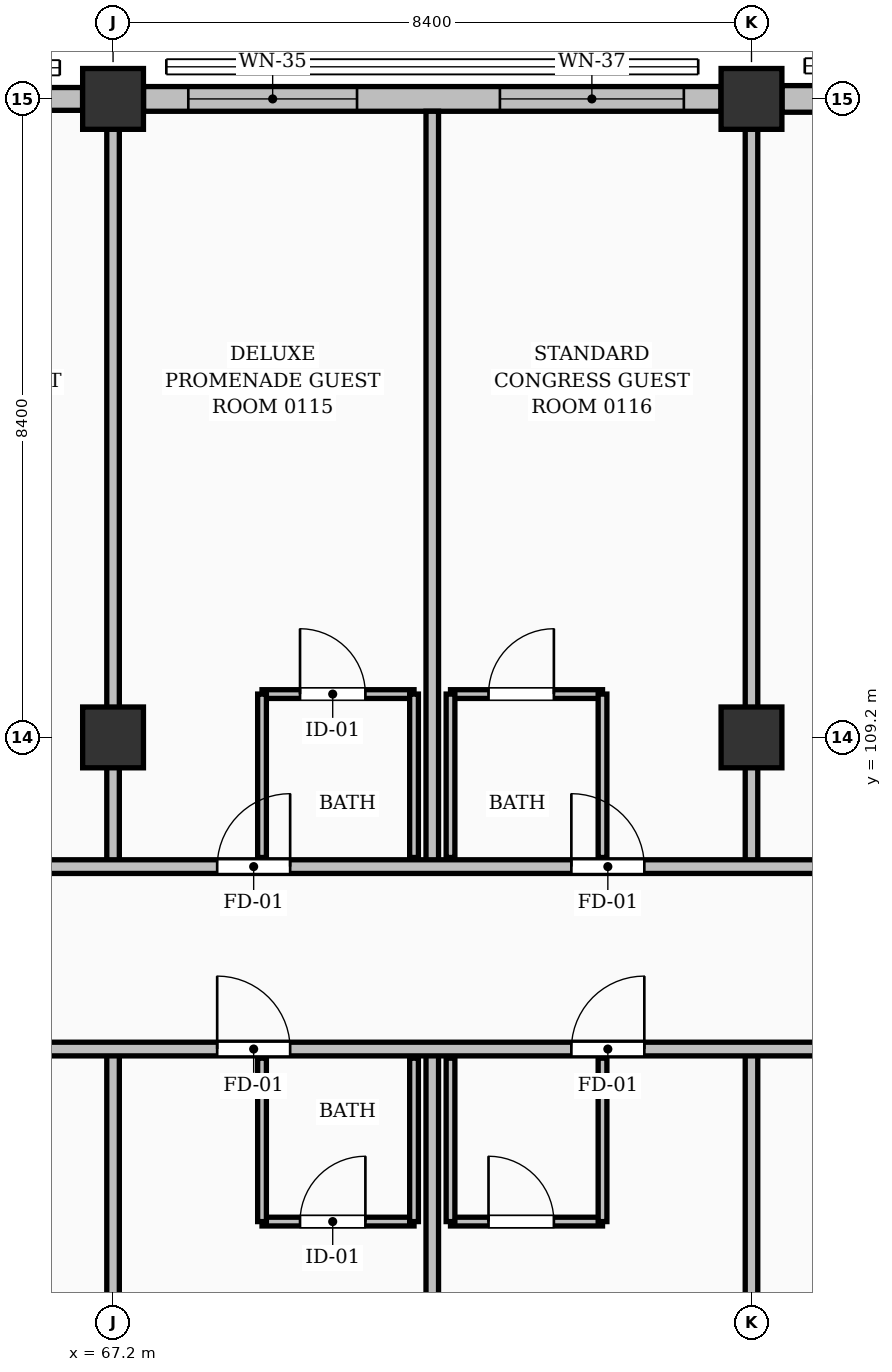
"""IFC4 building model, lengths in metres.
Left out: names, types, materials, properties, quantities, classifications, styles, units other than length and angle.
Written with IfcOpenShell. Run it as: python <this file> out.ifc"""

import sys

from ifc_helpers import new_model, si_unit, direction, frame, frame_2d, origin, origin_2d, place, context, subcontext, project, spatial, rectangle, extrude, element, fill, save


model = new_model("IFC4")
c1 = context("Model", 3, precision=1e-05, world=origin(), true_north=direction((0.0, 1.0)))
c2 = subcontext(c1, "Body", "Model", "MODEL_VIEW")
j1 = project(units=[si_unit("LENGTHUNIT", "METRE"), si_unit("PLANEANGLEUNIT", "RADIAN")], contexts=[c1])
p1 = place(None, origin())
s1 = spatial("IfcSite", under=j1, at=p1, CompositionType="ELEMENT")
p2 = place(p1, origin())
s2 = spatial("IfcBuilding", under=s1, at=p2, CompositionType="ELEMENT")
p3 = place(p2, frame((0.0, 0.0, 3.92)))
s3 = spatial("IfcBuildingStorey", under=s2, at=p3, CompositionType="ELEMENT", Elevation=3.92)
for number, where, z_axis, x_axis in (
    (1, (67.2, 109.2, 0.0), (0.0, 0.0, 1.0), (1.0, 0.0, 0.0)),
    (2, (67.2, 117.6, 0.0), (0.0, 0.0, 1.0), (1.0, 0.0, 0.0)),
    (3, (75.6, 109.2, 0.0), (0.0, 0.0, 1.0), (1.0, 0.0, 0.0)),
    (4, (75.6, 117.6, 0.0), (0.0, 0.0, 1.0), (1.0, 0.0, 0.0)),
):
    element("IfcColumn", number, at=place(p3, frame(where, z_axis=z_axis, x_axis=x_axis)), inside=s3, PredefinedType="COLUMN", context=c2, shape_type="SweptSolid", body=[
        extrude(rectangle(XDim=0.8, YDim=0.8, at=origin_2d()), origin(), (0.0, 0.0, 1.0), 3.64),
    ])
p4 = place(p3, frame((59.201, 117.6, 0.0), z_axis=(0.0, 0.0, 1.0), x_axis=(1.0, 0.0, 0.0)))
e5 = element("IfcWall", 5, at=p4, inside=s3, PredefinedType="SOLIDWALL", context=c2, shape_type="SweptSolid", body=[
    extrude(rectangle(XDim=7.598, YDim=0.3, at=frame_2d((3.799, 0.0))), origin(), (0.0, 0.0, 1.0), 2.445),
])
p5 = place(p4, frame((0.549, 0.0, 0.25)))
e6 = element("IfcOpeningElement", 6, at=p5, cuts=e5, PredefinedType="OPENING", context=c2, shape_type="SweptSolid", body=[
    extrude(rectangle(XDim=2.3, YDim=1.75, at=frame_2d((1.15, 0.875))), frame((0.0, 0.16, 0.0), z_axis=(0.0, -1.0, 0.0), x_axis=(1.0, 0.0, 0.0)), (0.0, 0.0, 1.0), 0.32),
])
p6 = place(p4, frame((4.789, 0.0, 0.25)))
e7 = element("IfcOpeningElement", 7, at=p6, cuts=e5, PredefinedType="OPENING", context=c2, shape_type="SweptSolid", body=[
    extrude(rectangle(XDim=2.22, YDim=1.9, at=frame_2d((1.11, 0.95))), frame((0.0, 0.16, 0.0), z_axis=(0.0, -1.0, 0.0), x_axis=(1.0, 0.0, 0.0)), (0.0, 0.0, 1.0), 0.32),
])
p7 = place(p3, frame((67.601, 117.6, 0.0), z_axis=(0.0, 0.0, 1.0), x_axis=(1.0, 0.0, 0.0)))
e8 = element("IfcWall", 8, at=p7, inside=s3, PredefinedType="SOLIDWALL", context=c2, shape_type="SweptSolid", body=[
    extrude(rectangle(XDim=7.598, YDim=0.325, at=frame_2d((3.799, 0.0))), origin(), (0.0, 0.0, 1.0), 2.445),
])
p8 = place(p7, frame((0.589, 0.0, 0.25)))
e9 = element("IfcOpeningElement", 9, at=p8, cuts=e8, PredefinedType="OPENING", context=c2, shape_type="SweptSolid", body=[
    extrude(rectangle(XDim=2.22, YDim=1.9, at=frame_2d((1.11, 0.95))), frame((0.0, 0.172, 0.0), z_axis=(0.0, -1.0, 0.0), x_axis=(1.0, 0.0, 0.0)), (0.0, 0.0, 1.0), 0.345),
])
p9 = place(p7, frame((4.689, 0.0, 0.25)))
e10 = element("IfcOpeningElement", 10, at=p9, cuts=e8, PredefinedType="OPENING", context=c2, shape_type="SweptSolid", body=[
    extrude(rectangle(XDim=2.42, YDim=1.9, at=frame_2d((1.21, 0.95))), frame((0.0, 0.172, 0.0), z_axis=(0.0, -1.0, 0.0), x_axis=(1.0, 0.0, 0.0)), (0.0, 0.0, 1.0), 0.345),
])
p10 = place(p3, frame((76.001, 117.6, 0.0), z_axis=(0.0, 0.0, 1.0), x_axis=(1.0, 0.0, 0.0)))
e11 = element("IfcWall", 11, at=p10, inside=s3, PredefinedType="SOLIDWALL", context=c2, shape_type="SweptSolid", body=[
    extrude(rectangle(XDim=7.548, YDim=0.35, at=frame_2d((3.774, 0.0))), origin(), (0.0, 0.0, 1.0), 2.445),
])
p11 = place(p10, frame((0.489, 0.0, 0.25)))
e12 = element("IfcOpeningElement", 12, at=p11, cuts=e11, PredefinedType="OPENING", context=c2, shape_type="SweptSolid", body=[
    extrude(rectangle(XDim=2.42, YDim=1.9, at=frame_2d((1.21, 0.95))), frame((0.0, 0.185, 0.0), z_axis=(0.0, -1.0, 0.0), x_axis=(1.0, 0.0, 0.0)), (0.0, 0.0, 1.0), 0.37),
])
p12 = place(p10, frame((4.709, 0.0, 0.25)))
e13 = element("IfcOpeningElement", 13, at=p12, cuts=e11, PredefinedType="OPENING", context=c2, shape_type="SweptSolid", body=[
    extrude(rectangle(XDim=2.38, YDim=2.0, at=frame_2d((1.19, 1.0))), frame((0.0, 0.185, 0.0), z_axis=(0.0, -1.0, 0.0), x_axis=(1.0, 0.0, 0.0)), (0.0, 0.0, 1.0), 0.37),
])
p13 = place(p3, frame((69.16, 109.77, 0.0), z_axis=(0.0, 0.0, 1.0), x_axis=(1.0, 0.0, 0.0)))
e14 = element("IfcWall", 14, at=p13, inside=s3, PredefinedType="PARTITIONING", context=c2, shape_type="SweptSolid", body=[
    extrude(rectangle(XDim=2.0, YDim=0.115, at=frame_2d((1.0, 0.0))), origin(), (0.0, 0.0, 1.0), 3.36),
])
p14 = place(p13, frame((0.5, 0.0, 0.0)))
e15 = element("IfcOpeningElement", 15, at=p14, cuts=e14, PredefinedType="OPENING", context=c2, shape_type="SweptSolid", body=[
    extrude(rectangle(XDim=0.86, YDim=2.05, at=frame_2d((0.43, 1.025))), frame((0.0, 0.067, 0.0), z_axis=(0.0, -1.0, 0.0), x_axis=(1.0, 0.0, 0.0)), (0.0, 0.0, 1.0), 0.135),
])
for number, where, z_axis, x_axis in (
    (16, (69.16, 107.62, 0.0), (0.0, 0.0, 1.0), (0.0, 1.0, 0.0)),
    (17, (71.16, 107.62, 0.0), (0.0, 0.0, 1.0), (0.0, 1.0, 0.0)),
):
    element("IfcWall", number, at=place(p3, frame(where, z_axis=z_axis, x_axis=x_axis)), inside=s3, PredefinedType="PARTITIONING", context=c2, shape_type="SweptSolid", body=[
        extrude(rectangle(XDim=2.15, YDim=0.115, at=frame_2d((1.075, 0.0))), origin(), (0.0, 0.0, 1.0), 3.36),
    ])
p15 = place(p3, frame((71.64, 109.77, 0.0), z_axis=(0.0, 0.0, 1.0), x_axis=(1.0, 0.0, 0.0)))
e18 = element("IfcWall", 18, at=p15, inside=s3, PredefinedType="PARTITIONING", context=c2, shape_type="SweptSolid", body=[
    extrude(rectangle(XDim=2.0, YDim=0.115, at=frame_2d((1.0, 0.0))), origin(), (0.0, 0.0, 1.0), 3.36),
])
p16 = place(p15, frame((0.5, 0.0, 0.0)))
e19 = element("IfcOpeningElement", 19, at=p16, cuts=e18, PredefinedType="OPENING", context=c2, shape_type="SweptSolid", body=[
    extrude(rectangle(XDim=0.86, YDim=2.05, at=frame_2d((0.43, 1.025))), frame((0.0, 0.067, 0.0), z_axis=(0.0, -1.0, 0.0), x_axis=(1.0, 0.0, 0.0)), (0.0, 0.0, 1.0), 0.135),
])
for number, where, z_axis, x_axis in (
    (20, (71.64, 107.62, 0.0), (0.0, 0.0, 1.0), (0.0, 1.0, 0.0)),
    (21, (73.64, 107.62, 0.0), (0.0, 0.0, 1.0), (0.0, 1.0, 0.0)),
):
    element("IfcWall", number, at=place(p3, frame(where, z_axis=z_axis, x_axis=x_axis)), inside=s3, PredefinedType="PARTITIONING", context=c2, shape_type="SweptSolid", body=[
        extrude(rectangle(XDim=2.15, YDim=0.115, at=frame_2d((1.075, 0.0))), origin(), (0.0, 0.0, 1.0), 3.36),
    ])
p17 = place(p3, frame((71.4, 107.5, 0.0), z_axis=(0.0, 0.0, 1.0), x_axis=(0.0, 1.0, 0.0)))
e22 = element("IfcWall", 22, at=p17, inside=s3, PredefinedType="PARTITIONING", context=c2, shape_type="SweptSolid", body=[
    extrude(rectangle(XDim=9.938, YDim=0.165, at=frame_2d((4.969, 0.0))), origin(), (0.0, 0.0, 1.0), 3.36),
])
for number, where, z_axis, x_axis in (
    (23, (67.2, 107.5, 0.0), (0.0, 0.0, 1.0), (0.0, 1.0, 0.0)),
    (24, (75.6, 107.5, 0.0), (0.0, 0.0, 1.0), (0.0, 1.0, 0.0)),
):
    element("IfcWall", number, at=place(p3, frame(where, z_axis=z_axis, x_axis=x_axis)), inside=s3, PredefinedType="PARTITIONING", context=c2, shape_type="SweptSolid", body=[
        extrude(rectangle(XDim=9.75, YDim=0.165, at=frame_2d((4.875, 0.0))), origin(), (0.0, 0.0, 1.0), 2.495),
    ])
p18 = place(p3, frame((40.66, 107.5, 0.0), z_axis=(0.0, 0.0, 1.0), x_axis=(1.0, 0.0, 0.0)))
e25 = element("IfcWall", 25, at=p18, inside=s3, PredefinedType="PARTITIONING", context=c2, shape_type="SweptSolid", body=[
    extrude(rectangle(XDim=43.15, YDim=0.18, at=frame_2d((21.575, 0.0))), origin(), (0.0, 0.0, 1.0), 3.36),
])
p19 = place(p18, frame((0.2, 0.0, 0.0)))
e26 = element("IfcOpeningElement", 26, at=p19, cuts=e25, PredefinedType="OPENING", context=c2, shape_type="SweptSolid", body=[
    extrude(rectangle(XDim=0.94, YDim=2.1, at=frame_2d((0.47, 1.05))), frame((0.0, 0.1, 0.0), z_axis=(0.0, -1.0, 0.0), x_axis=(1.0, 0.0, 0.0)), (0.0, 0.0, 1.0), 0.2),
])
p20 = place(p18, frame((2.71, 0.0, 0.0)))
e27 = element("IfcOpeningElement", 27, at=p20, cuts=e25, PredefinedType="OPENING", context=c2, shape_type="SweptSolid", body=[
    extrude(rectangle(XDim=0.96, YDim=2.15, at=frame_2d((0.48, 1.075))), frame((0.0, 0.1, 0.0), z_axis=(0.0, -1.0, 0.0), x_axis=(1.0, 0.0, 0.0)), (0.0, 0.0, 1.0), 0.2),
])
p21 = place(p18, frame((7.37, 0.0, 0.0)))
e28 = element("IfcOpeningElement", 28, at=p21, cuts=e25, PredefinedType="OPENING", context=c2, shape_type="SweptSolid", body=[
    extrude(rectangle(XDim=0.96, YDim=2.15, at=frame_2d((0.48, 1.075))), frame((0.0, 0.1, 0.0), z_axis=(0.0, -1.0, 0.0), x_axis=(1.0, 0.0, 0.0)), (0.0, 0.0, 1.0), 0.2),
])
p22 = place(p18, frame((11.11, 0.0, 0.0)))
e29 = element("IfcOpeningElement", 29, at=p22, cuts=e25, PredefinedType="OPENING", context=c2, shape_type="SweptSolid", body=[
    extrude(rectangle(XDim=0.96, YDim=2.15, at=frame_2d((0.48, 1.075))), frame((0.0, 0.1, 0.0), z_axis=(0.0, -1.0, 0.0), x_axis=(1.0, 0.0, 0.0)), (0.0, 0.0, 1.0), 0.2),
])
p23 = place(p18, frame((15.77, 0.0, 0.0)))
e30 = element("IfcOpeningElement", 30, at=p23, cuts=e25, PredefinedType="OPENING", context=c2, shape_type="SweptSolid", body=[
    extrude(rectangle(XDim=0.96, YDim=2.15, at=frame_2d((0.48, 1.075))), frame((0.0, 0.1, 0.0), z_axis=(0.0, -1.0, 0.0), x_axis=(1.0, 0.0, 0.0)), (0.0, 0.0, 1.0), 0.2),
])
p24 = place(p18, frame((19.51, 0.0, 0.0)))
e31 = element("IfcOpeningElement", 31, at=p24, cuts=e25, PredefinedType="OPENING", context=c2, shape_type="SweptSolid", body=[
    extrude(rectangle(XDim=0.96, YDim=2.15, at=frame_2d((0.48, 1.075))), frame((0.0, 0.1, 0.0), z_axis=(0.0, -1.0, 0.0), x_axis=(1.0, 0.0, 0.0)), (0.0, 0.0, 1.0), 0.2),
])
p25 = place(p18, frame((24.17, 0.0, 0.0)))
e32 = element("IfcOpeningElement", 32, at=p25, cuts=e25, PredefinedType="OPENING", context=c2, shape_type="SweptSolid", body=[
    extrude(rectangle(XDim=0.96, YDim=2.15, at=frame_2d((0.48, 1.075))), frame((0.0, 0.1, 0.0), z_axis=(0.0, -1.0, 0.0), x_axis=(1.0, 0.0, 0.0)), (0.0, 0.0, 1.0), 0.2),
])
p26 = place(p18, frame((27.91, 0.0, 0.0)))
e33 = element("IfcOpeningElement", 33, at=p26, cuts=e25, PredefinedType="OPENING", context=c2, shape_type="SweptSolid", body=[
    extrude(rectangle(XDim=0.96, YDim=2.15, at=frame_2d((0.48, 1.075))), frame((0.0, 0.1, 0.0), z_axis=(0.0, -1.0, 0.0), x_axis=(1.0, 0.0, 0.0)), (0.0, 0.0, 1.0), 0.2),
])
p27 = place(p18, frame((32.57, 0.0, 0.0)))
e34 = element("IfcOpeningElement", 34, at=p27, cuts=e25, PredefinedType="OPENING", context=c2, shape_type="SweptSolid", body=[
    extrude(rectangle(XDim=0.96, YDim=2.15, at=frame_2d((0.48, 1.075))), frame((0.0, 0.1, 0.0), z_axis=(0.0, -1.0, 0.0), x_axis=(1.0, 0.0, 0.0)), (0.0, 0.0, 1.0), 0.2),
])
p28 = place(p18, frame((36.31, 0.0, 0.0)))
e35 = element("IfcOpeningElement", 35, at=p28, cuts=e25, PredefinedType="OPENING", context=c2, shape_type="SweptSolid", body=[
    extrude(rectangle(XDim=0.96, YDim=2.15, at=frame_2d((0.48, 1.075))), frame((0.0, 0.1, 0.0), z_axis=(0.0, -1.0, 0.0), x_axis=(1.0, 0.0, 0.0)), (0.0, 0.0, 1.0), 0.2),
])
p29 = place(p18, frame((40.97, 0.0, 0.0)))
e36 = element("IfcOpeningElement", 36, at=p29, cuts=e25, PredefinedType="OPENING", context=c2, shape_type="SweptSolid", body=[
    extrude(rectangle(XDim=0.96, YDim=2.15, at=frame_2d((0.48, 1.075))), frame((0.0, 0.1, 0.0), z_axis=(0.0, -1.0, 0.0), x_axis=(1.0, 0.0, 0.0)), (0.0, 0.0, 1.0), 0.2),
])
p30 = place(p3, frame((69.16, 102.83, 0.0), z_axis=(0.0, 0.0, 1.0), x_axis=(1.0, 0.0, 0.0)))
e37 = element("IfcWall", 37, at=p30, inside=s3, PredefinedType="PARTITIONING", context=c2, shape_type="SweptSolid", body=[
    extrude(rectangle(XDim=2.0, YDim=0.115, at=frame_2d((1.0, 0.0))), origin(), (0.0, 0.0, 1.0), 3.36),
])
p31 = place(p30, frame((0.5, 0.0, 0.0)))
e38 = element("IfcOpeningElement", 38, at=p31, cuts=e37, PredefinedType="OPENING", context=c2, shape_type="SweptSolid", body=[
    extrude(rectangle(XDim=0.86, YDim=2.05, at=frame_2d((0.43, 1.025))), frame((0.0, 0.067, 0.0), z_axis=(0.0, -1.0, 0.0), x_axis=(1.0, 0.0, 0.0)), (0.0, 0.0, 1.0), 0.135),
])
for number, where, z_axis, x_axis in (
    (39, (69.16, 102.83, 0.0), (0.0, 0.0, 1.0), (0.0, 1.0, 0.0)),
    (40, (71.16, 102.83, 0.0), (0.0, 0.0, 1.0), (0.0, 1.0, 0.0)),
):
    element("IfcWall", number, at=place(p3, frame(where, z_axis=z_axis, x_axis=x_axis)), inside=s3, PredefinedType="PARTITIONING", context=c2, shape_type="SweptSolid", body=[
        extrude(rectangle(XDim=2.15, YDim=0.115, at=frame_2d((1.075, 0.0))), origin(), (0.0, 0.0, 1.0), 3.36),
    ])
p32 = place(p3, frame((71.64, 102.83, 0.0), z_axis=(0.0, 0.0, 1.0), x_axis=(1.0, 0.0, 0.0)))
e41 = element("IfcWall", 41, at=p32, inside=s3, PredefinedType="PARTITIONING", context=c2, shape_type="SweptSolid", body=[
    extrude(rectangle(XDim=2.0, YDim=0.115, at=frame_2d((1.0, 0.0))), origin(), (0.0, 0.0, 1.0), 3.36),
])
p33 = place(p32, frame((0.5, 0.0, 0.0)))
e42 = element("IfcOpeningElement", 42, at=p33, cuts=e41, PredefinedType="OPENING", context=c2, shape_type="SweptSolid", body=[
    extrude(rectangle(XDim=0.86, YDim=2.05, at=frame_2d((0.43, 1.025))), frame((0.0, 0.067, 0.0), z_axis=(0.0, -1.0, 0.0), x_axis=(1.0, 0.0, 0.0)), (0.0, 0.0, 1.0), 0.135),
])
for number, where, z_axis, x_axis in (
    (43, (71.64, 102.83, 0.0), (0.0, 0.0, 1.0), (0.0, 1.0, 0.0)),
    (44, (73.64, 102.83, 0.0), (0.0, 0.0, 1.0), (0.0, 1.0, 0.0)),
):
    element("IfcWall", number, at=place(p3, frame(where, z_axis=z_axis, x_axis=x_axis)), inside=s3, PredefinedType="PARTITIONING", context=c2, shape_type="SweptSolid", body=[
        extrude(rectangle(XDim=2.15, YDim=0.115, at=frame_2d((1.075, 0.0))), origin(), (0.0, 0.0, 1.0), 3.36),
    ])
p34 = place(p3, frame((71.4, 84.163, 0.0), z_axis=(0.0, 0.0, 1.0), x_axis=(0.0, 1.0, 0.0)))
e45 = element("IfcWall", 45, at=p34, inside=s3, PredefinedType="PARTITIONING", context=c2, shape_type="SweptSolid", body=[
    extrude(rectangle(XDim=20.938, YDim=0.165, at=frame_2d((10.469, 0.0))), origin(), (0.0, 0.0, 1.0), 3.36),
])
for number, where, z_axis, x_axis in (
    (46, (67.2, 84.35, 0.0), (0.0, 0.0, 1.0), (0.0, 1.0, 0.0)),
    (47, (75.6, 84.35, 0.0), (0.0, 0.0, 1.0), (0.0, 1.0, 0.0)),
):
    element("IfcWall", number, at=place(p3, frame(where, z_axis=z_axis, x_axis=x_axis)), inside=s3, PredefinedType="PARTITIONING", context=c2, shape_type="SweptSolid", body=[
        extrude(rectangle(XDim=20.75, YDim=0.165, at=frame_2d((10.375, 0.0))), origin(), (0.0, 0.0, 1.0), 2.495),
    ])
p35 = place(p3, frame((54.4, 105.1, 0.0), z_axis=(0.0, 0.0, 1.0), x_axis=(1.0, 0.0, 0.0)))
e48 = element("IfcWall", 48, at=p35, inside=s3, PredefinedType="PARTITIONING", context=c2, shape_type="SweptSolid", body=[
    extrude(rectangle(XDim=29.41, YDim=0.18, at=frame_2d((14.705, 0.0))), origin(), (0.0, 0.0, 1.0), 3.36),
])
p36 = place(p35, frame((2.03, 0.0, 0.0)))
e49 = element("IfcOpeningElement", 49, at=p36, cuts=e48, PredefinedType="OPENING", context=c2, shape_type="SweptSolid", body=[
    extrude(rectangle(XDim=0.96, YDim=2.15, at=frame_2d((0.48, 1.075))), frame((0.0, 0.1, 0.0), z_axis=(0.0, -1.0, 0.0), x_axis=(1.0, 0.0, 0.0)), (0.0, 0.0, 1.0), 0.2),
])
p37 = place(p35, frame((5.77, 0.0, 0.0)))
e50 = element("IfcOpeningElement", 50, at=p37, cuts=e48, PredefinedType="OPENING", context=c2, shape_type="SweptSolid", body=[
    extrude(rectangle(XDim=0.96, YDim=2.15, at=frame_2d((0.48, 1.075))), frame((0.0, 0.1, 0.0), z_axis=(0.0, -1.0, 0.0), x_axis=(1.0, 0.0, 0.0)), (0.0, 0.0, 1.0), 0.2),
])
p38 = place(p35, frame((10.43, 0.0, 0.0)))
e51 = element("IfcOpeningElement", 51, at=p38, cuts=e48, PredefinedType="OPENING", context=c2, shape_type="SweptSolid", body=[
    extrude(rectangle(XDim=0.96, YDim=2.15, at=frame_2d((0.48, 1.075))), frame((0.0, 0.1, 0.0), z_axis=(0.0, -1.0, 0.0), x_axis=(1.0, 0.0, 0.0)), (0.0, 0.0, 1.0), 0.2),
])
p39 = place(p35, frame((14.17, 0.0, 0.0)))
e52 = element("IfcOpeningElement", 52, at=p39, cuts=e48, PredefinedType="OPENING", context=c2, shape_type="SweptSolid", body=[
    extrude(rectangle(XDim=0.96, YDim=2.15, at=frame_2d((0.48, 1.075))), frame((0.0, 0.1, 0.0), z_axis=(0.0, -1.0, 0.0), x_axis=(1.0, 0.0, 0.0)), (0.0, 0.0, 1.0), 0.2),
])
p40 = place(p35, frame((18.83, 0.0, 0.0)))
e53 = element("IfcOpeningElement", 53, at=p40, cuts=e48, PredefinedType="OPENING", context=c2, shape_type="SweptSolid", body=[
    extrude(rectangle(XDim=0.96, YDim=2.15, at=frame_2d((0.48, 1.075))), frame((0.0, 0.1, 0.0), z_axis=(0.0, -1.0, 0.0), x_axis=(1.0, 0.0, 0.0)), (0.0, 0.0, 1.0), 0.2),
])
p41 = place(p35, frame((22.57, 0.0, 0.0)))
e54 = element("IfcOpeningElement", 54, at=p41, cuts=e48, PredefinedType="OPENING", context=c2, shape_type="SweptSolid", body=[
    extrude(rectangle(XDim=0.96, YDim=2.15, at=frame_2d((0.48, 1.075))), frame((0.0, 0.1, 0.0), z_axis=(0.0, -1.0, 0.0), x_axis=(1.0, 0.0, 0.0)), (0.0, 0.0, 1.0), 0.2),
])
p42 = place(p35, frame((27.23, 0.0, 0.0)))
e55 = element("IfcOpeningElement", 55, at=p42, cuts=e48, PredefinedType="OPENING", context=c2, shape_type="SweptSolid", body=[
    extrude(rectangle(XDim=0.96, YDim=2.15, at=frame_2d((0.48, 1.075))), frame((0.0, 0.1, 0.0), z_axis=(0.0, -1.0, 0.0), x_axis=(1.0, 0.0, 0.0)), (0.0, 0.0, 1.0), 0.2),
])
p43 = place(p8, origin())
e56 = element("IfcWindow", 56, at=p43, inside=s3, PartitioningType="DOUBLE_PANEL_VERTICAL", PredefinedType="WINDOW", context=c2, shape_type="SweptSolid", body=[
    extrude(rectangle(XDim=2.22, YDim=1.9, at=frame_2d((1.11, 0.95))), frame((0.0, 0.03, 0.0), z_axis=(0.0, -1.0, 0.0), x_axis=(1.0, 0.0, 0.0)), (0.0, 0.0, 1.0), 0.06),
])
fill(e9, e56)
p44 = place(p9, origin())
e57 = element("IfcWindow", 57, at=p44, inside=s3, PartitioningType="DOUBLE_PANEL_VERTICAL", PredefinedType="WINDOW", context=c2, shape_type="SweptSolid", body=[
    extrude(rectangle(XDim=2.42, YDim=1.9, at=frame_2d((1.21, 0.95))), frame((0.0, 0.03, 0.0), z_axis=(0.0, -1.0, 0.0), x_axis=(1.0, 0.0, 0.0)), (0.0, 0.0, 1.0), 0.06),
])
fill(e10, e57)
p45 = place(p14, origin())
e58 = element("IfcDoor", 58, at=p45, inside=s3, OperationType="SINGLE_SWING_LEFT", PredefinedType="DOOR", context=c2, shape_type="SweptSolid", body=[
    extrude(rectangle(XDim=0.86, YDim=2.05, at=frame_2d((0.43, 1.025))), frame((0.0, 0.025, 0.0), z_axis=(0.0, -1.0, 0.0), x_axis=(1.0, 0.0, 0.0)), (0.0, 0.0, 1.0), 0.05),
])
fill(e15, e58)
p46 = place(p16, origin())
e59 = element("IfcDoor", 59, at=p46, inside=s3, OperationType="SINGLE_SWING_RIGHT", PredefinedType="DOOR", context=c2, shape_type="SweptSolid", body=[
    extrude(rectangle(XDim=0.86, YDim=2.05, at=frame_2d((0.43, 1.025))), frame((0.0, 0.025, 0.0), z_axis=(0.0, -1.0, 0.0), x_axis=(1.0, 0.0, 0.0)), (0.0, 0.0, 1.0), 0.05),
])
fill(e19, e59)
p47 = place(p26, origin())
e60 = element("IfcDoor", 60, at=p47, inside=s3, OperationType="SINGLE_SWING_RIGHT", PredefinedType="DOOR", context=c2, shape_type="SweptSolid", body=[
    extrude(rectangle(XDim=0.96, YDim=2.15, at=frame_2d((0.48, 1.075))), frame((0.0, 0.025, 0.0), z_axis=(0.0, -1.0, 0.0), x_axis=(1.0, 0.0, 0.0)), (0.0, 0.0, 1.0), 0.05),
])
fill(e33, e60)
p48 = place(p27, origin())
e61 = element("IfcDoor", 61, at=p48, inside=s3, OperationType="SINGLE_SWING_LEFT", PredefinedType="DOOR", context=c2, shape_type="SweptSolid", body=[
    extrude(rectangle(XDim=0.96, YDim=2.15, at=frame_2d((0.48, 1.075))), frame((0.0, 0.025, 0.0), z_axis=(0.0, -1.0, 0.0), x_axis=(1.0, 0.0, 0.0)), (0.0, 0.0, 1.0), 0.05),
])
fill(e34, e61)
p49 = place(p31, origin())
e62 = element("IfcDoor", 62, at=p49, inside=s3, OperationType="SINGLE_SWING_RIGHT", PredefinedType="DOOR", context=c2, shape_type="SweptSolid", body=[
    extrude(rectangle(XDim=0.86, YDim=2.05, at=frame_2d((0.43, 1.025))), frame((0.0, 0.025, 0.0), z_axis=(0.0, -1.0, 0.0), x_axis=(1.0, 0.0, 0.0)), (0.0, 0.0, 1.0), 0.05),
])
fill(e38, e62)
p50 = place(p33, origin())
e63 = element("IfcDoor", 63, at=p50, inside=s3, OperationType="SINGLE_SWING_LEFT", PredefinedType="DOOR", context=c2, shape_type="SweptSolid", body=[
    extrude(rectangle(XDim=0.86, YDim=2.05, at=frame_2d((0.43, 1.025))), frame((0.0, 0.025, 0.0), z_axis=(0.0, -1.0, 0.0), x_axis=(1.0, 0.0, 0.0)), (0.0, 0.0, 1.0), 0.05),
])
fill(e42, e63)
p51 = place(p39, origin())
e64 = element("IfcDoor", 64, at=p51, inside=s3, OperationType="SINGLE_SWING_LEFT", PredefinedType="DOOR", context=c2, shape_type="SweptSolid", body=[
    extrude(rectangle(XDim=0.96, YDim=2.15, at=frame_2d((0.48, 1.075))), frame((0.0, 0.025, 0.0), z_axis=(0.0, -1.0, 0.0), x_axis=(1.0, 0.0, 0.0)), (0.0, 0.0, 1.0), 0.05),
])
fill(e52, e64)
p52 = place(p40, origin())
e65 = element("IfcDoor", 65, at=p52, inside=s3, OperationType="SINGLE_SWING_RIGHT", PredefinedType="DOOR", context=c2, shape_type="SweptSolid", body=[
    extrude(rectangle(XDim=0.96, YDim=2.15, at=frame_2d((0.48, 1.075))), frame((0.0, 0.025, 0.0), z_axis=(0.0, -1.0, 0.0), x_axis=(1.0, 0.0, 0.0)), (0.0, 0.0, 1.0), 0.05),
])
fill(e53, e65)
save(model, sys.argv[1])
